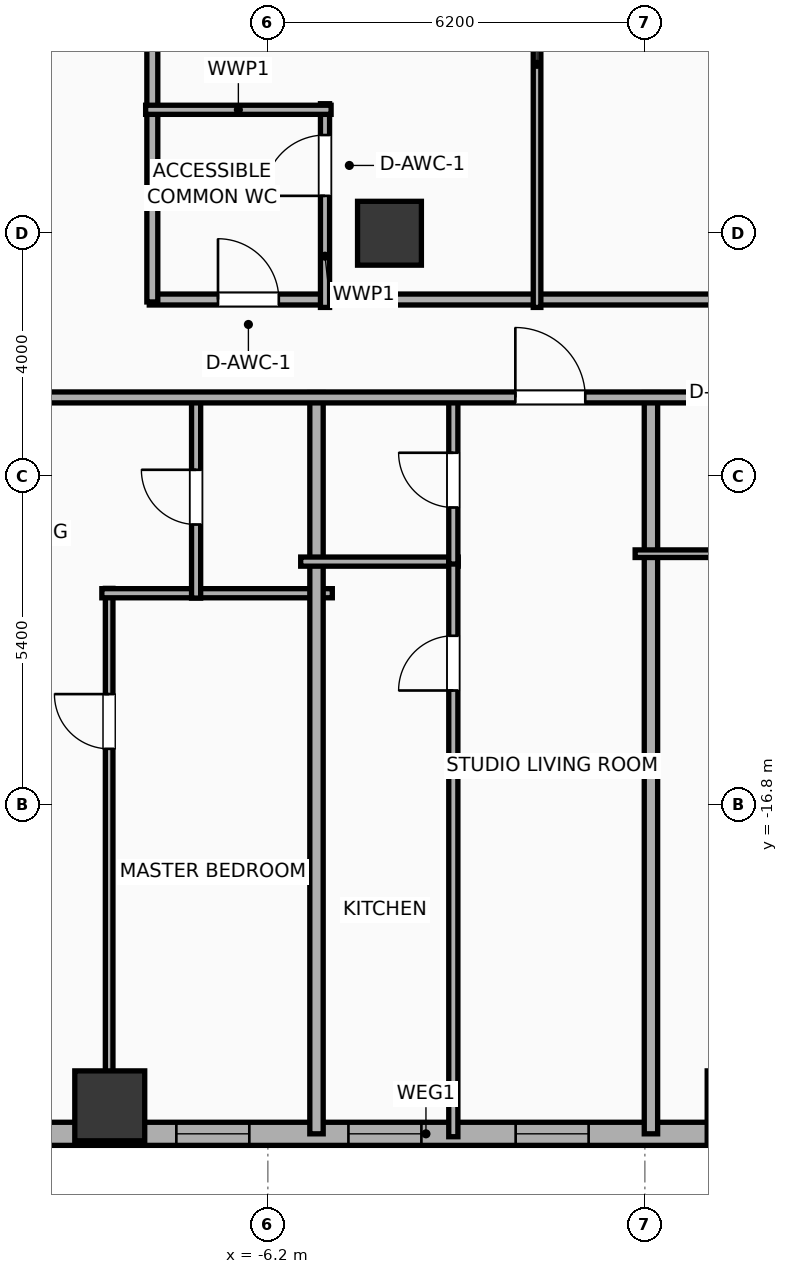
"""IFC4 building model, lengths in metres.
Left out: names, types, materials, properties, quantities, classifications, styles, units other than length and angle.
Written with IfcOpenShell. Run it as: python <this file> out.ifc"""

import sys

from ifc_helpers import new_model, si_unit, direction, frame, frame_2d, origin, origin_2d, place, context, subcontext, project, spatial, rectangle, hollow_rectangle, extrude, element, fill, save


model = new_model("IFC4")
c1 = context("Model", 3, precision=1e-05, world=origin(), true_north=direction((0.0, 1.0)))
c2 = subcontext(c1, "Body", "Model", "MODEL_VIEW")
j1 = project(units=[si_unit("LENGTHUNIT", "METRE"), si_unit("PLANEANGLEUNIT", "RADIAN")], contexts=[c1])
p1 = place(None, origin())
s1 = spatial("IfcSite", under=j1, at=p1, CompositionType="ELEMENT")
p2 = place(p1, origin())
s2 = spatial("IfcBuilding", under=s1, at=p2, CompositionType="ELEMENT")
p3 = place(p2, frame((0.0, 0.0, 41.6)))
s3 = spatial("IfcBuildingStorey", under=s2, at=p3, CompositionType="ELEMENT", Elevation=41.6)
p4 = place(p3, frame((-4.2, -7.4, 0.0), z_axis=(0.0, 0.0, 1.0), x_axis=(1.0, 0.0, 0.0)))
e1 = element("IfcColumn", 1, at=p4, inside=s3, PredefinedType="COLUMN", context=c2, shape_type="SweptSolid", body=[
    extrude(rectangle(XDim=1.05, YDim=1.05, at=origin_2d()), origin(), (0.0, 0.0, 1.0), 3.9),
])
for number, where, z_axis, x_axis in (
    (2, (-8.8, -21.75, 0.0), (0.0, 0.0, 1.0), (1.0, 0.0, 0.0)),
    (3, (1.6, -21.75, 0.0), (0.0, 0.0, 1.0), (1.0, 0.0, 0.0)),
):
    element("IfcColumn", number, at=place(p3, frame(where, z_axis=z_axis, x_axis=x_axis)), inside=s3, PredefinedType="COLUMN", context=c2, shape_type="SweptSolid", body=[
        extrude(hollow_rectangle(XDim=1.15, YDim=1.15, WallThickness=0.04, at=origin_2d()), origin(), (0.0, 0.0, 1.0), 3.9),
    ])
p5 = place(p3, frame((22.381, -22.21, 0.0), z_axis=(0.0, 0.0, 1.0), x_axis=(-1.0, 0.0, 0.0)))
e4 = element("IfcWall", 4, at=p5, inside=s3, PredefinedType="ELEMENTEDWALL", context=c2, shape_type="SweptSolid", body=[
    extrude(rectangle(XDim=51.963, YDim=0.38, at=frame_2d((25.981, 0.0))), origin(), (0.0, 0.0, 1.0), 3.65),
])
p6 = place(p5, frame((42.952, 0.0, 0.75)))
e5 = element("IfcOpeningElement", 5, at=p6, cuts=e4, PredefinedType="OPENING", context=c2, shape_type="SweptSolid", body=[
    extrude(rectangle(XDim=2.4, YDim=2.1, at=frame_2d((1.2, 1.05))), frame((0.0, 0.2, 0.0), z_axis=(0.0, -1.0, 0.0), x_axis=(1.0, 0.0, 0.0)), (0.0, 0.0, 1.0), 0.4),
])
p7 = place(p5, frame((49.847, 0.0, 0.75)))
e6 = element("IfcOpeningElement", 6, at=p7, cuts=e4, PredefinedType="OPENING", context=c2, shape_type="SweptSolid", body=[
    extrude(rectangle(XDim=1.2, YDim=2.05, at=frame_2d((0.6, 1.025))), frame((0.0, 0.2, 0.0), z_axis=(0.0, -1.0, 0.0), x_axis=(1.0, 0.0, 0.0)), (0.0, 0.0, 1.0), 0.4),
])
p8 = place(p5, frame((47.445, 0.0, 0.75)))
e7 = element("IfcOpeningElement", 7, at=p8, cuts=e4, PredefinedType="OPENING", context=c2, shape_type="SweptSolid", body=[
    extrude(rectangle(XDim=1.2, YDim=2.05, at=frame_2d((0.6, 1.025))), frame((0.0, 0.2, 0.0), z_axis=(0.0, -1.0, 0.0), x_axis=(1.0, 0.0, 0.0)), (0.0, 0.0, 1.0), 0.4),
])
p9 = place(p5, frame((39.526, 0.0, 0.75)))
e8 = element("IfcOpeningElement", 8, at=p9, cuts=e4, PredefinedType="OPENING", context=c2, shape_type="SweptSolid", body=[
    extrude(rectangle(XDim=1.2, YDim=2.05, at=frame_2d((0.6, 1.025))), frame((0.0, 0.2, 0.0), z_axis=(0.0, -1.0, 0.0), x_axis=(1.0, 0.0, 0.0)), (0.0, 0.0, 1.0), 0.4),
])
p10 = place(p5, frame((33.018, 0.0, 0.75)))
e9 = element("IfcOpeningElement", 9, at=p10, cuts=e4, PredefinedType="OPENING", context=c2, shape_type="SweptSolid", body=[
    extrude(rectangle(XDim=1.2, YDim=2.05, at=frame_2d((0.6, 1.025))), frame((0.0, 0.2, 0.0), z_axis=(0.0, -1.0, 0.0), x_axis=(1.0, 0.0, 0.0)), (0.0, 0.0, 1.0), 0.4),
])
p11 = place(p5, frame((36.813, 0.0, 0.75)))
e10 = element("IfcOpeningElement", 10, at=p11, cuts=e4, PredefinedType="OPENING", context=c2, shape_type="SweptSolid", body=[
    extrude(rectangle(XDim=1.2, YDim=2.05, at=frame_2d((0.6, 1.025))), frame((0.0, 0.2, 0.0), z_axis=(0.0, -1.0, 0.0), x_axis=(1.0, 0.0, 0.0)), (0.0, 0.0, 1.0), 0.4),
])
p12 = place(p5, frame((28.886, 0.0, 0.75)))
e11 = element("IfcOpeningElement", 11, at=p12, cuts=e4, PredefinedType="OPENING", context=c2, shape_type="SweptSolid", body=[
    extrude(rectangle(XDim=1.2, YDim=2.05, at=frame_2d((0.6, 1.025))), frame((0.0, 0.2, 0.0), z_axis=(0.0, -1.0, 0.0), x_axis=(1.0, 0.0, 0.0)), (0.0, 0.0, 1.0), 0.4),
])
p13 = place(p5, frame((23.306, 0.0, 0.75)))
e12 = element("IfcOpeningElement", 12, at=p13, cuts=e4, PredefinedType="OPENING", context=c2, shape_type="SweptSolid", body=[
    extrude(rectangle(XDim=1.2, YDim=2.05, at=frame_2d((0.6, 1.025))), frame((0.0, 0.2, 0.0), z_axis=(0.0, -1.0, 0.0), x_axis=(1.0, 0.0, 0.0)), (0.0, 0.0, 1.0), 0.4),
])
p14 = place(p5, frame((26.056, 0.0, 0.75)))
e13 = element("IfcOpeningElement", 13, at=p14, cuts=e4, PredefinedType="OPENING", context=c2, shape_type="SweptSolid", body=[
    extrude(rectangle(XDim=1.2, YDim=2.05, at=frame_2d((0.6, 1.025))), frame((0.0, 0.2, 0.0), z_axis=(0.0, -1.0, 0.0), x_axis=(1.0, 0.0, 0.0)), (0.0, 0.0, 1.0), 0.4),
])
p15 = place(p5, frame((18.811, 0.0, 0.75)))
e14 = element("IfcOpeningElement", 14, at=p15, cuts=e4, PredefinedType="OPENING", context=c2, shape_type="SweptSolid", body=[
    extrude(rectangle(XDim=1.2, YDim=2.05, at=frame_2d((0.6, 1.025))), frame((0.0, 0.2, 0.0), z_axis=(0.0, -1.0, 0.0), x_axis=(1.0, 0.0, 0.0)), (0.0, 0.0, 1.0), 0.4),
])
p16 = place(p5, frame((14.602, 0.0, 0.75)))
e15 = element("IfcOpeningElement", 15, at=p16, cuts=e4, PredefinedType="OPENING", context=c2, shape_type="SweptSolid", body=[
    extrude(rectangle(XDim=1.2, YDim=2.05, at=frame_2d((0.6, 1.025))), frame((0.0, 0.2, 0.0), z_axis=(0.0, -1.0, 0.0), x_axis=(1.0, 0.0, 0.0)), (0.0, 0.0, 1.0), 0.4),
])
p17 = place(p5, frame((11.852, 0.0, 0.75)))
e16 = element("IfcOpeningElement", 16, at=p17, cuts=e4, PredefinedType="OPENING", context=c2, shape_type="SweptSolid", body=[
    extrude(rectangle(XDim=1.2, YDim=2.05, at=frame_2d((0.6, 1.025))), frame((0.0, 0.2, 0.0), z_axis=(0.0, -1.0, 0.0), x_axis=(1.0, 0.0, 0.0)), (0.0, 0.0, 1.0), 0.4),
])
p18 = place(p5, frame((8.316, 0.0, 0.75)))
e17 = element("IfcOpeningElement", 17, at=p18, cuts=e4, PredefinedType="OPENING", context=c2, shape_type="SweptSolid", body=[
    extrude(rectangle(XDim=1.2, YDim=2.05, at=frame_2d((0.6, 1.025))), frame((0.0, 0.2, 0.0), z_axis=(0.0, -1.0, 0.0), x_axis=(1.0, 0.0, 0.0)), (0.0, 0.0, 1.0), 0.4),
])
p19 = place(p5, frame((6.286, 0.0, 0.75)))
e18 = element("IfcOpeningElement", 18, at=p19, cuts=e4, PredefinedType="OPENING", context=c2, shape_type="SweptSolid", body=[
    extrude(rectangle(XDim=1.2, YDim=2.05, at=frame_2d((0.6, 1.025))), frame((0.0, 0.2, 0.0), z_axis=(0.0, -1.0, 0.0), x_axis=(1.0, 0.0, 0.0)), (0.0, 0.0, 1.0), 0.4),
])
p20 = place(p5, frame((3.737, 0.0, 0.75)))
e19 = element("IfcOpeningElement", 19, at=p20, cuts=e4, PredefinedType="OPENING", context=c2, shape_type="SweptSolid", body=[
    extrude(rectangle(XDim=1.2, YDim=2.05, at=frame_2d((0.6, 1.025))), frame((0.0, 0.2, 0.0), z_axis=(0.0, -1.0, 0.0), x_axis=(1.0, 0.0, 0.0)), (0.0, 0.0, 1.0), 0.4),
])
p21 = place(p5, frame((1.291, 0.0, 0.75)))
e20 = element("IfcOpeningElement", 20, at=p21, cuts=e4, PredefinedType="OPENING", context=c2, shape_type="SweptSolid", body=[
    extrude(rectangle(XDim=1.2, YDim=2.05, at=frame_2d((0.6, 1.025))), frame((0.0, 0.2, 0.0), z_axis=(0.0, -1.0, 0.0), x_axis=(1.0, 0.0, 0.0)), (0.0, 0.0, 1.0), 0.4),
])
p22 = place(p3, frame((-8.15, -8.49, 0.0), z_axis=(0.0, 0.0, 1.0), x_axis=(1.0, 0.0, 0.0)))
e21 = element("IfcWall", 21, at=p22, inside=s3, PredefinedType="PARTITIONING", context=c2, shape_type="SweptSolid", body=[
    extrude(rectangle(XDim=16.3, YDim=0.18, at=frame_2d((8.15, 0.0))), origin(), (0.0, 0.0, 1.0), 3.65),
])
p23 = place(p22, frame((1.13, 0.0, 0.0)))
e22 = element("IfcOpeningElement", 22, at=p23, cuts=e21, PredefinedType="OPENING", context=c2, shape_type="SweptSolid", body=[
    extrude(rectangle(XDim=1.0, YDim=2.05, at=frame_2d((0.5, 1.025))), frame((0.0, 0.1, 0.0), z_axis=(0.0, -1.0, 0.0), x_axis=(1.0, 0.0, 0.0)), (0.0, 0.0, 1.0), 0.2),
])
p24 = place(p22, frame((10.12, 0.0, 0.0)))
e23 = element("IfcOpeningElement", 23, at=p24, cuts=e21, PredefinedType="OPENING", context=c2, shape_type="SweptSolid", body=[
    extrude(rectangle(XDim=0.95, YDim=2.05, at=frame_2d((0.475, 1.025))), frame((0.0, 0.1, 0.0), z_axis=(0.0, -1.0, 0.0), x_axis=(1.0, 0.0, 0.0)), (0.0, 0.0, 1.0), 0.2),
])
p25 = place(p3, frame((-8.1, -8.53, 0.0), z_axis=(0.0, 0.0, 1.0), x_axis=(0.0, 1.0, 0.0)))
e24 = element("IfcWall", 24, at=p25, inside=s3, PredefinedType="PARTITIONING", context=c2, shape_type="SweptSolid", body=[
    extrude(rectangle(XDim=17.06, YDim=0.18, at=frame_2d((8.53, 0.0))), origin(), (0.0, 0.0, 1.0), 3.65),
])
p26 = place(p3, frame((-5.26, -8.62, 0.0), z_axis=(0.0, 0.0, 1.0), x_axis=(0.0, 1.0, 0.0)))
e25 = element("IfcWall", 25, at=p26, inside=s3, PredefinedType="PLUMBINGWALL", context=c2, shape_type="SweptSolid", body=[
    extrude(rectangle(XDim=3.35, YDim=0.15, at=frame_2d((1.675, 0.0))), origin(), (0.0, 0.0, 1.0), 3.65),
])
p27 = place(p26, frame((1.835, 0.0, 0.0)))
e26 = element("IfcOpeningElement", 26, at=p27, cuts=e25, PredefinedType="OPENING", context=c2, shape_type="SweptSolid", body=[
    extrude(rectangle(XDim=1.0, YDim=2.05, at=frame_2d((0.5, 1.025))), frame((0.0, 0.085, 0.0), z_axis=(0.0, -1.0, 0.0), x_axis=(1.0, 0.0, 0.0)), (0.0, 0.0, 1.0), 0.17),
])
p28 = place(p3, frame((-8.21, -5.37, 0.0), z_axis=(0.0, 0.0, 1.0), x_axis=(1.0, 0.0, 0.0)))
e27 = element("IfcWall", 27, at=p28, inside=s3, PredefinedType="PLUMBINGWALL", context=c2, shape_type="SweptSolid", body=[
    extrude(rectangle(XDim=3.05, YDim=0.15, at=frame_2d((1.525, 0.0))), origin(), (0.0, 0.0, 1.0), 3.65),
])
p29 = place(p3, frame((-1.773, -8.62, 0.0), z_axis=(0.0, 0.0, 1.0), x_axis=(0.0, 1.0, 0.0)))
e28 = element("IfcWall", 28, at=p29, inside=s3, PredefinedType="PARTITIONING", context=c2, shape_type="SweptSolid", body=[
    extrude(rectangle(XDim=17.24, YDim=0.125, at=frame_2d((8.62, 0.0))), origin(), (0.0, 0.0, 1.0), 3.65),
])
p30 = place(p29, frame((8.145, 0.0, 0.0)))
e29 = element("IfcOpeningElement", 29, at=p30, cuts=e28, PredefinedType="OPENING", context=c2, shape_type="SweptSolid", body=[
    extrude(rectangle(XDim=0.95, YDim=2.05, at=frame_2d((0.475, 1.025))), frame((0.0, 0.073, 0.0), z_axis=(0.0, -1.0, 0.0), x_axis=(1.0, 0.0, 0.0)), (0.0, 0.0, 1.0), 0.145),
])
p31 = place(p3, frame((-8.81, -22.36, 0.0), z_axis=(0.0, 0.0, 1.0), x_axis=(0.0, 1.0, 0.0)))
e30 = element("IfcWall", 30, at=p31, inside=s3, PredefinedType="PARTITIONING", context=c2, shape_type="SweptSolid", body=[
    extrude(rectangle(XDim=9.12, YDim=0.125, at=frame_2d((4.56, 0.0))), origin(), (0.0, 0.0, 1.0), 2.94),
])
p32 = place(p31, frame((6.481, 0.0, 0.0)))
e31 = element("IfcOpeningElement", 31, at=p32, cuts=e30, PredefinedType="OPENING", context=c2, shape_type="SweptSolid", body=[
    extrude(rectangle(XDim=0.9, YDim=2.05, at=frame_2d((0.45, 1.025))), frame((0.0, 0.073, 0.0), z_axis=(0.0, -1.0, 0.0), x_axis=(1.0, 0.0, 0.0)), (0.0, 0.0, 1.0), 0.145),
])
p33 = place(p3, frame((-8.93, -13.32, 0.0), z_axis=(0.0, 0.0, 1.0), x_axis=(1.0, 0.0, 0.0)))
e32 = element("IfcWall", 32, at=p33, inside=s3, PredefinedType="PLUMBINGWALL", context=c2, shape_type="SweptSolid", body=[
    extrude(rectangle(XDim=3.79, YDim=0.15, at=frame_2d((1.895, 0.0))), origin(), (0.0, 0.0, 1.0), 3.65),
])
p34 = place(p3, frame((-7.38, -13.4, 0.0), z_axis=(0.0, 0.0, 1.0), x_axis=(0.0, 1.0, 0.0)))
e33 = element("IfcWall", 33, at=p34, inside=s3, PredefinedType="PLUMBINGWALL", context=c2, shape_type="SweptSolid", body=[
    extrude(rectangle(XDim=3.32, YDim=0.15, at=frame_2d((1.66, 0.0))), origin(), (0.0, 0.0, 1.0), 3.65),
])
p35 = place(p34, frame((1.21, 0.0, 0.0)))
e34 = element("IfcOpeningElement", 34, at=p35, cuts=e33, PredefinedType="OPENING", context=c2, shape_type="SweptSolid", body=[
    extrude(rectangle(XDim=0.9, YDim=2.05, at=frame_2d((0.45, 1.025))), frame((0.0, 0.085, 0.0), z_axis=(0.0, -1.0, 0.0), x_axis=(1.0, 0.0, 0.0)), (0.0, 0.0, 1.0), 0.17),
])
p36 = place(p3, frame((-5.4, -22.21, 0.0), z_axis=(0.0, 0.0, 1.0), x_axis=(0.0, 1.0, 0.0)))
e35 = element("IfcWall", 35, at=p36, inside=s3, PredefinedType="PARTITIONING", context=c2, shape_type="SweptSolid", body=[
    extrude(rectangle(XDim=12.19, YDim=0.22, at=frame_2d((6.095, 0.0))), origin(), (0.0, 0.0, 1.0), 3.65),
])
p37 = place(p3, frame((-5.66, -12.8, 0.0), z_axis=(0.0, 0.0, 1.0), x_axis=(1.0, 0.0, 0.0)))
e36 = element("IfcWall", 36, at=p37, inside=s3, PredefinedType="PLUMBINGWALL", context=c2, shape_type="SweptSolid", body=[
    extrude(rectangle(XDim=2.59, YDim=0.15, at=frame_2d((1.295, 0.0))), origin(), (0.0, 0.0, 1.0), 3.65),
])
p38 = place(p3, frame((-3.15, -22.258, 0.0), z_axis=(0.0, 0.0, 1.0), x_axis=(0.0, 1.0, 0.0)))
e37 = element("IfcWall", 37, at=p38, inside=s3, PredefinedType="PLUMBINGWALL", context=c2, shape_type="SweptSolid", body=[
    extrude(rectangle(XDim=9.498, YDim=0.15, at=frame_2d((4.749, 0.0))), origin(), (0.0, 0.0, 1.0), 3.65),
])
p39 = place(p38, frame((7.338, 0.0, 0.0)))
e38 = element("IfcOpeningElement", 38, at=p39, cuts=e37, PredefinedType="OPENING", context=c2, shape_type="SweptSolid", body=[
    extrude(rectangle(XDim=0.9, YDim=2.05, at=frame_2d((0.45, 1.025))), frame((0.0, 0.085, 0.0), z_axis=(0.0, -1.0, 0.0), x_axis=(1.0, 0.0, 0.0)), (0.0, 0.0, 1.0), 0.17),
])
p40 = place(p3, frame((-3.15, -12.84, 0.0), z_axis=(0.0, 0.0, 1.0), x_axis=(0.0, 1.0, 0.0)))
e39 = element("IfcWall", 39, at=p40, inside=s3, PredefinedType="PLUMBINGWALL", context=c2, shape_type="SweptSolid", body=[
    extrude(rectangle(XDim=2.76, YDim=0.15, at=frame_2d((1.38, 0.0))), origin(), (0.0, 0.0, 1.0), 3.65),
])
p41 = place(p40, frame((0.93, 0.0, 0.0)))
e40 = element("IfcOpeningElement", 40, at=p41, cuts=e39, PredefinedType="OPENING", context=c2, shape_type="SweptSolid", body=[
    extrude(rectangle(XDim=0.9, YDim=2.05, at=frame_2d((0.45, 1.025))), frame((0.0, 0.085, 0.0), z_axis=(0.0, -1.0, 0.0), x_axis=(1.0, 0.0, 0.0)), (0.0, 0.0, 1.0), 0.17),
])
p42 = place(p3, frame((0.1, -22.21, 0.0), z_axis=(0.0, 0.0, 1.0), x_axis=(0.0, 1.0, 0.0)))
e41 = element("IfcWall", 41, at=p42, inside=s3, PredefinedType="PARTITIONING", context=c2, shape_type="SweptSolid", body=[
    extrude(rectangle(XDim=12.19, YDim=0.22, at=frame_2d((6.095, 0.0))), origin(), (0.0, 0.0, 1.0), 3.65),
])
p43 = place(p3, frame((-0.16, -12.67, 0.0), z_axis=(0.0, 0.0, 1.0), x_axis=(1.0, 0.0, 0.0)))
e42 = element("IfcWall", 42, at=p43, inside=s3, PredefinedType="PARTITIONING", context=c2, shape_type="SweptSolid", body=[
    extrude(rectangle(XDim=2.63, YDim=0.125, at=frame_2d((1.315, 0.0))), origin(), (0.0, 0.0, 1.0), 3.65),
])
p44 = place(p3, frame((-33.41, -10.1, 0.0), z_axis=(0.0, 0.0, 1.0), x_axis=(1.0, 0.0, 0.0)))
e43 = element("IfcWall", 43, at=p44, inside=s3, PredefinedType="PARTITIONING", context=c2, shape_type="SweptSolid", body=[
    extrude(rectangle(XDim=59.62, YDim=0.18, at=frame_2d((29.81, 0.0))), origin(), (0.0, 0.0, 1.0), 3.65),
])
p45 = place(p44, frame((2.746, 0.0, 0.0)))
e44 = element("IfcOpeningElement", 44, at=p45, cuts=e43, PredefinedType="OPENING", context=c2, shape_type="SweptSolid", body=[
    extrude(rectangle(XDim=0.9, YDim=2.05, at=frame_2d((0.45, 1.025))), frame((0.0, 0.1, 0.0), z_axis=(0.0, -1.0, 0.0), x_axis=(1.0, 0.0, 0.0)), (0.0, 0.0, 1.0), 0.2),
])
p46 = place(p44, frame((11.552, 0.0, 0.0)))
e45 = element("IfcOpeningElement", 45, at=p46, cuts=e43, PredefinedType="OPENING", context=c2, shape_type="SweptSolid", body=[
    extrude(rectangle(XDim=1.15, YDim=2.05, at=frame_2d((0.575, 1.025))), frame((0.0, 0.1, 0.0), z_axis=(0.0, -1.0, 0.0), x_axis=(1.0, 0.0, 0.0)), (0.0, 0.0, 1.0), 0.2),
])
p47 = place(p44, frame((22.379, 0.0, 0.0)))
e46 = element("IfcOpeningElement", 46, at=p47, cuts=e43, PredefinedType="OPENING", context=c2, shape_type="SweptSolid", body=[
    extrude(rectangle(XDim=1.15, YDim=2.05, at=frame_2d((0.575, 1.025))), frame((0.0, 0.1, 0.0), z_axis=(0.0, -1.0, 0.0), x_axis=(1.0, 0.0, 0.0)), (0.0, 0.0, 1.0), 0.2),
])
p48 = place(p44, frame((31.28, 0.0, 0.0)))
e47 = element("IfcOpeningElement", 47, at=p48, cuts=e43, PredefinedType="OPENING", context=c2, shape_type="SweptSolid", body=[
    extrude(rectangle(XDim=1.15, YDim=2.05, at=frame_2d((0.575, 1.025))), frame((0.0, 0.1, 0.0), z_axis=(0.0, -1.0, 0.0), x_axis=(1.0, 0.0, 0.0)), (0.0, 0.0, 1.0), 0.2),
])
p49 = place(p44, frame((36.02, 0.0, 0.0)))
e48 = element("IfcOpeningElement", 48, at=p49, cuts=e43, PredefinedType="OPENING", context=c2, shape_type="SweptSolid", body=[
    extrude(rectangle(XDim=0.9, YDim=2.05, at=frame_2d((0.45, 1.025))), frame((0.0, 0.1, 0.0), z_axis=(0.0, -1.0, 0.0), x_axis=(1.0, 0.0, 0.0)), (0.0, 0.0, 1.0), 0.2),
])
p50 = place(p44, frame((40.044, 0.0, 0.0)))
e49 = element("IfcOpeningElement", 49, at=p50, cuts=e43, PredefinedType="OPENING", context=c2, shape_type="SweptSolid", body=[
    extrude(rectangle(XDim=1.15, YDim=2.05, at=frame_2d((0.575, 1.025))), frame((0.0, 0.1, 0.0), z_axis=(0.0, -1.0, 0.0), x_axis=(1.0, 0.0, 0.0)), (0.0, 0.0, 1.0), 0.2),
])
p51 = place(p44, frame((45.613, 0.0, 0.0)))
e50 = element("IfcOpeningElement", 50, at=p51, cuts=e43, PredefinedType="OPENING", context=c2, shape_type="SweptSolid", body=[
    extrude(rectangle(XDim=1.15, YDim=2.05, at=frame_2d((0.575, 1.025))), frame((0.0, 0.1, 0.0), z_axis=(0.0, -1.0, 0.0), x_axis=(1.0, 0.0, 0.0)), (0.0, 0.0, 1.0), 0.2),
])
p52 = place(p44, frame((54.174, 0.0, 0.0)))
e51 = element("IfcOpeningElement", 51, at=p52, cuts=e43, PredefinedType="OPENING", context=c2, shape_type="SweptSolid", body=[
    extrude(rectangle(XDim=1.15, YDim=2.05, at=frame_2d((0.575, 1.025))), frame((0.0, 0.1, 0.0), z_axis=(0.0, -1.0, 0.0), x_axis=(1.0, 0.0, 0.0)), (0.0, 0.0, 1.0), 0.2),
])
p53 = place(p12, origin())
e52 = element("IfcWindow", 52, at=p53, inside=s3, PartitioningType="SINGLE_PANEL", PredefinedType="WINDOW", context=c2, shape_type="SweptSolid", body=[
    extrude(rectangle(XDim=1.2, YDim=2.05, at=frame_2d((0.6, 1.025))), frame((0.0, 0.03, 0.0), z_axis=(0.0, -1.0, 0.0), x_axis=(1.0, 0.0, 0.0)), (0.0, 0.0, 1.0), 0.06),
])
fill(e11, e52)
p54 = place(p13, origin())
e53 = element("IfcWindow", 53, at=p54, inside=s3, PartitioningType="SINGLE_PANEL", PredefinedType="WINDOW", context=c2, shape_type="SweptSolid", body=[
    extrude(rectangle(XDim=1.2, YDim=2.05, at=frame_2d((0.6, 1.025))), frame((0.0, 0.03, 0.0), z_axis=(0.0, -1.0, 0.0), x_axis=(1.0, 0.0, 0.0)), (0.0, 0.0, 1.0), 0.06),
])
fill(e12, e53)
p55 = place(p14, origin())
e54 = element("IfcWindow", 54, at=p55, inside=s3, PartitioningType="SINGLE_PANEL", PredefinedType="WINDOW", context=c2, shape_type="SweptSolid", body=[
    extrude(rectangle(XDim=1.2, YDim=2.05, at=frame_2d((0.6, 1.025))), frame((0.0, 0.03, 0.0), z_axis=(0.0, -1.0, 0.0), x_axis=(1.0, 0.0, 0.0)), (0.0, 0.0, 1.0), 0.06),
])
fill(e13, e54)
p56 = place(p23, origin())
e55 = element("IfcDoor", 55, at=p56, inside=s3, OperationType="SINGLE_SWING_LEFT", PredefinedType="DOOR", context=c2, shape_type="SweptSolid", body=[
    extrude(rectangle(XDim=1.0, YDim=2.05, at=frame_2d((0.5, 1.025))), frame((0.0, 0.025, 0.0), z_axis=(0.0, -1.0, 0.0), x_axis=(1.0, 0.0, 0.0)), (0.0, 0.0, 1.0), 0.05),
])
fill(e22, e55)
p57 = place(p27, origin())
e56 = element("IfcDoor", 56, at=p57, inside=s3, OperationType="SINGLE_SWING_LEFT", PredefinedType="DOOR", context=c2, shape_type="SweptSolid", body=[
    extrude(rectangle(XDim=1.0, YDim=2.05, at=frame_2d((0.5, 1.025))), frame((0.0, 0.025, 0.0), z_axis=(0.0, -1.0, 0.0), x_axis=(1.0, 0.0, 0.0)), (0.0, 0.0, 1.0), 0.05),
])
fill(e26, e56)
p58 = place(p32, origin())
e57 = element("IfcDoor", 57, at=p58, inside=s3, OperationType="SINGLE_SWING_RIGHT", PredefinedType="DOOR", context=c2, shape_type="SweptSolid", body=[
    extrude(rectangle(XDim=0.9, YDim=2.05, at=frame_2d((0.45, 1.025))), frame((0.0, 0.025, 0.0), z_axis=(0.0, -1.0, 0.0), x_axis=(1.0, 0.0, 0.0)), (0.0, 0.0, 1.0), 0.05),
])
fill(e31, e57)
p59 = place(p35, origin())
e58 = element("IfcDoor", 58, at=p59, inside=s3, OperationType="SINGLE_SWING_RIGHT", PredefinedType="DOOR", context=c2, shape_type="SweptSolid", body=[
    extrude(rectangle(XDim=0.9, YDim=2.05, at=frame_2d((0.45, 1.025))), frame((0.0, 0.025, 0.0), z_axis=(0.0, -1.0, 0.0), x_axis=(1.0, 0.0, 0.0)), (0.0, 0.0, 1.0), 0.05),
])
fill(e34, e58)
p60 = place(p39, origin())
e59 = element("IfcDoor", 59, at=p60, inside=s3, OperationType="SINGLE_SWING_LEFT", PredefinedType="DOOR", context=c2, shape_type="SweptSolid", body=[
    extrude(rectangle(XDim=0.9, YDim=2.05, at=frame_2d((0.45, 1.025))), frame((0.0, 0.025, 0.0), z_axis=(0.0, -1.0, 0.0), x_axis=(1.0, 0.0, 0.0)), (0.0, 0.0, 1.0), 0.05),
])
fill(e38, e59)
p61 = place(p41, origin())
e60 = element("IfcDoor", 60, at=p61, inside=s3, OperationType="SINGLE_SWING_RIGHT", PredefinedType="DOOR", context=c2, shape_type="SweptSolid", body=[
    extrude(rectangle(XDim=0.9, YDim=2.05, at=frame_2d((0.45, 1.025))), frame((0.0, 0.025, 0.0), z_axis=(0.0, -1.0, 0.0), x_axis=(1.0, 0.0, 0.0)), (0.0, 0.0, 1.0), 0.05),
])
fill(e40, e60)
p62 = place(p48, origin())
e61 = element("IfcDoor", 61, at=p62, inside=s3, OperationType="SINGLE_SWING_LEFT", PredefinedType="DOOR", context=c2, shape_type="SweptSolid", body=[
    extrude(rectangle(XDim=1.15, YDim=2.05, at=frame_2d((0.575, 1.025))), frame((0.0, 0.025, 0.0), z_axis=(0.0, -1.0, 0.0), x_axis=(1.0, 0.0, 0.0)), (0.0, 0.0, 1.0), 0.05),
])
fill(e47, e61)
save(model, sys.argv[1])
